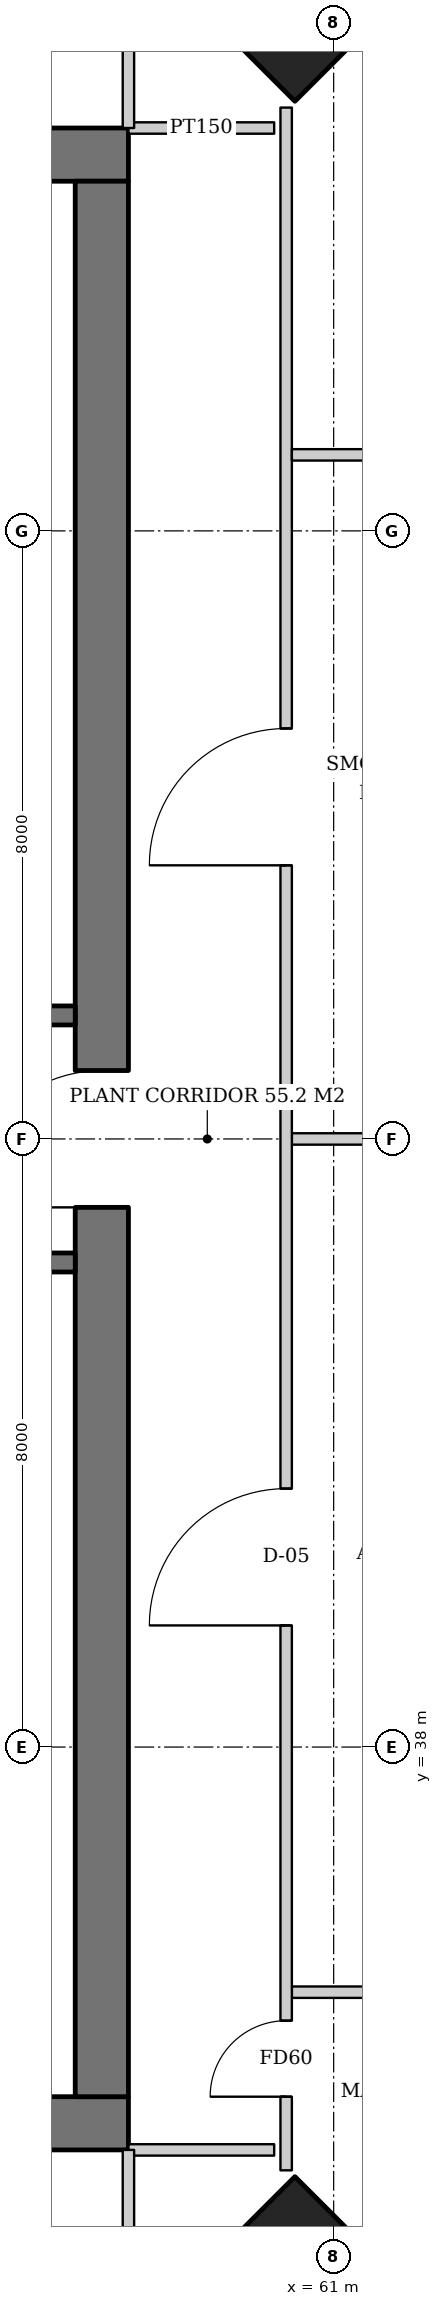
"""IFC4 building model, lengths in metres.
Left out: names, types, materials, properties, quantities, classifications, styles, units other than length and angle.
Written with IfcOpenShell. Run it as: python <this file> out.ifc"""

import sys

from ifc_helpers import new_model, si_unit, direction, frame, frame_2d, origin, origin_2d, place, context, subcontext, project, spatial, rectangle, extrude, element, fill, save


model = new_model("IFC4")
c1 = context("Model", 3, precision=1e-05, world=origin(), true_north=direction((0.0, 1.0)))
c2 = subcontext(c1, "Body", "Model", "MODEL_VIEW")
j1 = project(units=[si_unit("LENGTHUNIT", "METRE"), si_unit("PLANEANGLEUNIT", "RADIAN")], contexts=[c1])
p1 = place(None, origin())
s1 = spatial("IfcSite", under=j1, at=p1, CompositionType="ELEMENT")
p2 = place(p1, origin())
s2 = spatial("IfcBuilding", under=s1, at=p2, CompositionType="ELEMENT")
p3 = place(p2, frame((0.0, 0.0, 157.8)))
s3 = spatial("IfcBuildingStorey", under=s2, at=p3, CompositionType="ELEMENT", Elevation=157.8)
for number, where, z_axis, x_axis in (
    (1, (60.529, 61.529, 0.0), (-0.032, -0.032, 0.999), (0.707, -0.707, 0.0)),
    (2, (60.529, 30.471, 0.0), (-0.032, 0.032, 0.999), (-0.707, -0.707, 0.0)),
):
    element("IfcColumn", number, at=place(p3, frame(where, z_axis=z_axis, x_axis=x_axis)), inside=s3, PredefinedType="COLUMN", context=c2, shape_type="SweptSolid", body=[
        extrude(rectangle(XDim=2.6, YDim=2.6, at=origin_2d()), origin(), (0.0, 0.0, 1.0), 3.804),
    ])
p4 = place(p3, frame((31.7, 33.05, 0.0), z_axis=(0.0, 0.0, 1.0), x_axis=(1.0, 0.0, 0.0)))
e3 = element("IfcWall", 3, at=p4, inside=s3, PredefinedType="SHEAR", context=c2, shape_type="SweptSolid", body=[
    extrude(rectangle(XDim=26.6, YDim=0.7, at=frame_2d((13.3, 0.0))), origin(), (0.0, 0.0, 1.0), 3.8),
])
p5 = place(p4, frame((7.3, 0.0, 0.0)))
e4 = element("IfcOpeningElement", 4, at=p5, cuts=e3, PredefinedType="OPENING", context=c2, shape_type="SweptSolid", body=[
    extrude(rectangle(XDim=1.0, YDim=2.1, at=frame_2d((0.5, 1.05))), frame((0.0, 0.36, 0.0), z_axis=(0.0, -1.0, 0.0), x_axis=(1.0, 0.0, 0.0)), (0.0, 0.0, 1.0), 0.72),
])
p6 = place(p4, frame((18.75, 0.0, 0.0)))
e5 = element("IfcOpeningElement", 5, at=p6, cuts=e3, PredefinedType="OPENING", context=c2, shape_type="SweptSolid", body=[
    extrude(rectangle(XDim=1.0, YDim=2.1, at=frame_2d((0.5, 1.05))), frame((0.0, 0.36, 0.0), z_axis=(0.0, -1.0, 0.0), x_axis=(1.0, 0.0, 0.0)), (0.0, 0.0, 1.0), 0.72),
])
p7 = place(p4, frame((1.85, 0.0, 0.0)))
e6 = element("IfcOpeningElement", 6, at=p7, cuts=e3, PredefinedType="OPENING", context=c2, shape_type="SweptSolid", body=[
    extrude(rectangle(XDim=1.0, YDim=2.1, at=frame_2d((0.5, 1.05))), frame((0.0, 0.36, 0.0), z_axis=(0.0, -1.0, 0.0), x_axis=(1.0, 0.0, 0.0)), (0.0, 0.0, 1.0), 0.72),
])
p8 = place(p4, frame((4.7, 0.0, 0.0)))
e7 = element("IfcOpeningElement", 7, at=p8, cuts=e3, PredefinedType="OPENING", context=c2, shape_type="SweptSolid", body=[
    extrude(rectangle(XDim=1.0, YDim=2.1, at=frame_2d((0.5, 1.05))), frame((0.0, 0.36, 0.0), z_axis=(0.0, -1.0, 0.0), x_axis=(1.0, 0.0, 0.0)), (0.0, 0.0, 1.0), 0.72),
])
p9 = place(p3, frame((31.7, 58.95, 0.0), z_axis=(0.0, 0.0, 1.0), x_axis=(1.0, 0.0, 0.0)))
e8 = element("IfcWall", 8, at=p9, inside=s3, PredefinedType="SHEAR", context=c2, shape_type="SweptSolid", body=[
    extrude(rectangle(XDim=26.6, YDim=0.7, at=frame_2d((13.3, 0.0))), origin(), (0.0, 0.0, 1.0), 3.8),
])
p10 = place(p9, frame((17.94, 0.0, 0.0)))
e9 = element("IfcOpeningElement", 9, at=p10, cuts=e8, PredefinedType="OPENING", context=c2, shape_type="SweptSolid", body=[
    extrude(rectangle(XDim=1.0, YDim=2.1, at=frame_2d((0.5, 1.05))), frame((0.0, 0.36, 0.0), z_axis=(0.0, -1.0, 0.0), x_axis=(1.0, 0.0, 0.0)), (0.0, 0.0, 1.0), 0.72),
])
p11 = place(p9, frame((5.825, 0.0, 0.0)))
e10 = element("IfcOpeningElement", 10, at=p11, cuts=e8, PredefinedType="OPENING", context=c2, shape_type="SweptSolid", body=[
    extrude(rectangle(XDim=1.0, YDim=2.1, at=frame_2d((0.5, 1.05))), frame((0.0, 0.36, 0.0), z_axis=(0.0, -1.0, 0.0), x_axis=(1.0, 0.0, 0.0)), (0.0, 0.0, 1.0), 0.72),
])
p12 = place(p9, frame((2.587, 0.0, 0.0)))
e11 = element("IfcOpeningElement", 11, at=p12, cuts=e8, PredefinedType="OPENING", context=c2, shape_type="SweptSolid", body=[
    extrude(rectangle(XDim=1.0, YDim=2.1, at=frame_2d((0.5, 1.05))), frame((0.0, 0.36, 0.0), z_axis=(0.0, -1.0, 0.0), x_axis=(1.0, 0.0, 0.0)), (0.0, 0.0, 1.0), 0.72),
])
p13 = place(p3, frame((57.95, 33.4, 0.0), z_axis=(0.0, 0.0, 1.0), x_axis=(0.0, 1.0, 0.0)))
e12 = element("IfcWall", 12, at=p13, inside=s3, PredefinedType="SHEAR", context=c2, shape_type="SweptSolid", body=[
    extrude(rectangle(XDim=25.2, YDim=0.7, at=frame_2d((12.6, 0.0))), origin(), (0.0, 0.0, 1.0), 3.8),
])
p14 = place(p13, frame((11.7, 0.0, 0.0)))
e13 = element("IfcOpeningElement", 13, at=p14, cuts=e12, PredefinedType="OPENING", context=c2, shape_type="SweptSolid", body=[
    extrude(rectangle(XDim=1.8, YDim=2.4, at=frame_2d((0.9, 1.2))), frame((0.0, 0.36, 0.0), z_axis=(0.0, -1.0, 0.0), x_axis=(1.0, 0.0, 0.0)), (0.0, 0.0, 1.0), 0.72),
])
p15 = place(p3, frame((54.9, 44.375, 0.0), z_axis=(0.0, 0.0, 1.0), x_axis=(1.0, 0.0, 0.0)))
e14 = element("IfcWall", 14, at=p15, inside=s3, PredefinedType="SOLIDWALL", context=c2, shape_type="SweptSolid", body=[
    extrude(rectangle(XDim=2.7, YDim=0.25, at=frame_2d((1.35, 0.0))), origin(), (0.0, 0.0, 1.0), 3.52),
])
p16 = place(p15, frame((0.85, 0.0, 0.0)))
e15 = element("IfcOpeningElement", 15, at=p16, cuts=e14, PredefinedType="OPENING", context=c2, shape_type="SweptSolid", body=[
    extrude(rectangle(XDim=1.0, YDim=2.1, at=frame_2d((0.5, 1.05))), frame((0.0, 0.135, 0.0), z_axis=(0.0, -1.0, 0.0), x_axis=(1.0, 0.0, 0.0)), (0.0, 0.0, 1.0), 0.27),
])
p17 = place(p3, frame((54.9, 47.625, 0.0), z_axis=(0.0, 0.0, 1.0), x_axis=(1.0, 0.0, 0.0)))
e16 = element("IfcWall", 16, at=p17, inside=s3, PredefinedType="SOLIDWALL", context=c2, shape_type="SweptSolid", body=[
    extrude(rectangle(XDim=2.7, YDim=0.25, at=frame_2d((1.35, 0.0))), origin(), (0.0, 0.0, 1.0), 3.52),
])
p18 = place(p17, frame((0.85, 0.0, 0.0)))
e17 = element("IfcOpeningElement", 17, at=p18, cuts=e16, PredefinedType="OPENING", context=c2, shape_type="SweptSolid", body=[
    extrude(rectangle(XDim=1.0, YDim=2.1, at=frame_2d((0.5, 1.05))), frame((0.0, 0.135, 0.0), z_axis=(0.0, -1.0, 0.0), x_axis=(1.0, 0.0, 0.0)), (0.0, 0.0, 1.0), 0.27),
])
for number, where, z_axis, x_axis in (
    (18, (58.3, 59.3, 0.0), (0.0, 0.0, 1.0), (1.0, 0.0, 0.0)),
    (19, (58.3, 32.7, 0.0), (0.0, 0.0, 1.0), (1.0, 0.0, 0.0)),
):
    element("IfcWall", number, at=place(p3, frame(where, z_axis=z_axis, x_axis=x_axis)), inside=s3, PredefinedType="PARTITIONING", context=c2, shape_type="SweptSolid", body=[
        extrude(rectangle(XDim=1.917, YDim=0.15, at=frame_2d((0.958, 0.0))), origin(), (0.0, 0.0, 1.0), 3.52),
    ])
p19 = place(p3, frame((60.45, 34.775, 0.0), z_axis=(0.0, 0.0, 1.0), x_axis=(1.0, 0.0, 0.0)))
e20 = element("IfcWall", 20, at=p19, inside=s3, PredefinedType="SOLIDWALL", context=c2, shape_type="SweptSolid", body=[
    extrude(rectangle(XDim=3.35, YDim=0.15, at=frame_2d((1.675, 0.0))), origin(), (0.0, 0.0, 1.0), 3.52),
])
p20 = place(p3, frame((60.45, 46.0, 0.0), z_axis=(0.0, 0.0, 1.0), x_axis=(1.0, 0.0, 0.0)))
e21 = element("IfcWall", 21, at=p20, inside=s3, PredefinedType="SOLIDWALL", context=c2, shape_type="SweptSolid", body=[
    extrude(rectangle(XDim=3.56, YDim=0.15, at=frame_2d((1.78, 0.0))), origin(), (0.0, 0.0, 1.0), 3.52),
])
p21 = place(p3, frame((60.375, 32.431, 0.0), z_axis=(0.0, 0.0, 1.0), x_axis=(0.0, 1.0, 0.0)))
e22 = element("IfcWall", 22, at=p21, inside=s3, PredefinedType="SOLIDWALL", context=c2, shape_type="SweptSolid", body=[
    extrude(rectangle(XDim=27.137, YDim=0.15, at=frame_2d((13.569, 0.0))), origin(), (0.0, 0.0, 1.0), 2.706),
])
p22 = place(p21, frame((0.969, 0.0, 0.0)))
e23 = element("IfcOpeningElement", 23, at=p22, cuts=e22, PredefinedType="OPENING", context=c2, shape_type="SweptSolid", body=[
    extrude(rectangle(XDim=1.0, YDim=2.1, at=frame_2d((0.5, 1.05))), frame((0.0, 0.085, 0.0), z_axis=(0.0, -1.0, 0.0), x_axis=(1.0, 0.0, 0.0)), (0.0, 0.0, 1.0), 0.17),
])
p23 = place(p21, frame((7.169, 0.0, 0.0)))
e24 = element("IfcOpeningElement", 24, at=p23, cuts=e22, PredefinedType="OPENING", context=c2, shape_type="SweptSolid", body=[
    extrude(rectangle(XDim=1.8, YDim=2.4, at=frame_2d((0.9, 1.2))), frame((0.0, 0.085, 0.0), z_axis=(0.0, -1.0, 0.0), x_axis=(1.0, 0.0, 0.0)), (0.0, 0.0, 1.0), 0.17),
])
p24 = place(p21, frame((17.169, 0.0, 0.0)))
e25 = element("IfcOpeningElement", 25, at=p24, cuts=e22, PredefinedType="OPENING", context=c2, shape_type="SweptSolid", body=[
    extrude(rectangle(XDim=1.8, YDim=2.4, at=frame_2d((0.9, 1.2))), frame((0.0, 0.085, 0.0), z_axis=(0.0, -1.0, 0.0), x_axis=(1.0, 0.0, 0.0)), (0.0, 0.0, 1.0), 0.17),
])
p25 = place(p3, frame((60.45, 55.0, 0.0), z_axis=(0.0, 0.0, 1.0), x_axis=(1.0, 0.0, 0.0)))
e26 = element("IfcWall", 26, at=p25, inside=s3, PredefinedType="SOLIDWALL", context=c2, shape_type="SweptSolid", body=[
    extrude(rectangle(XDim=3.35, YDim=0.15, at=frame_2d((1.675, 0.0))), origin(), (0.0, 0.0, 1.0), 3.52),
])
for number, where, z_axis, x_axis in (
    (27, (58.3, 59.3, 0.0), (0.0, 0.0, 1.0), (0.0, 1.0, 0.0)),
    (28, (58.3, 32.7, 0.0), (0.0, 0.0, 1.0), (0.0, -1.0, 0.0)),
):
    element("IfcWall", number, at=place(p3, frame(where, z_axis=z_axis, x_axis=x_axis)), inside=s3, PredefinedType="PARTITIONING", context=c2, shape_type="SweptSolid", body=[
        extrude(rectangle(XDim=1.917, YDim=0.15, at=frame_2d((0.958, 0.0))), origin(), (0.0, 0.0, 1.0), 3.52),
    ])
p26 = place(p14, origin())
e29 = element("IfcDoor", 29, at=p26, inside=s3, OperationType="DOUBLE_DOOR_SINGLE_SWING", PredefinedType="DOOR", context=c2, shape_type="SweptSolid", body=[
    extrude(rectangle(XDim=1.8, YDim=2.4, at=frame_2d((0.9, 1.2))), frame((0.0, 0.025, 0.0), z_axis=(0.0, -1.0, 0.0), x_axis=(1.0, 0.0, 0.0)), (0.0, 0.0, 1.0), 0.05),
])
fill(e13, e29)
p27 = place(p22, origin())
e30 = element("IfcDoor", 30, at=p27, inside=s3, OperationType="SINGLE_SWING_LEFT", PredefinedType="DOOR", context=c2, shape_type="SweptSolid", body=[
    extrude(rectangle(XDim=1.0, YDim=2.1, at=frame_2d((0.5, 1.05))), frame((0.0, 0.025, 0.0), z_axis=(0.0, -1.0, 0.0), x_axis=(1.0, 0.0, 0.0)), (0.0, 0.0, 1.0), 0.05),
])
fill(e23, e30)
p28 = place(p23, origin())
e31 = element("IfcDoor", 31, at=p28, inside=s3, OperationType="DOUBLE_DOOR_SINGLE_SWING", PredefinedType="DOOR", context=c2, shape_type="SweptSolid", body=[
    extrude(rectangle(XDim=1.8, YDim=2.4, at=frame_2d((0.9, 1.2))), frame((0.0, 0.025, 0.0), z_axis=(0.0, -1.0, 0.0), x_axis=(1.0, 0.0, 0.0)), (0.0, 0.0, 1.0), 0.05),
])
fill(e24, e31)
p29 = place(p24, origin())
e32 = element("IfcDoor", 32, at=p29, inside=s3, OperationType="DOUBLE_DOOR_SINGLE_SWING", PredefinedType="DOOR", context=c2, shape_type="SweptSolid", body=[
    extrude(rectangle(XDim=1.8, YDim=2.4, at=frame_2d((0.9, 1.2))), frame((0.0, 0.025, 0.0), z_axis=(0.0, -1.0, 0.0), x_axis=(1.0, 0.0, 0.0)), (0.0, 0.0, 1.0), 0.05),
])
fill(e25, e32)
save(model, sys.argv[1])
